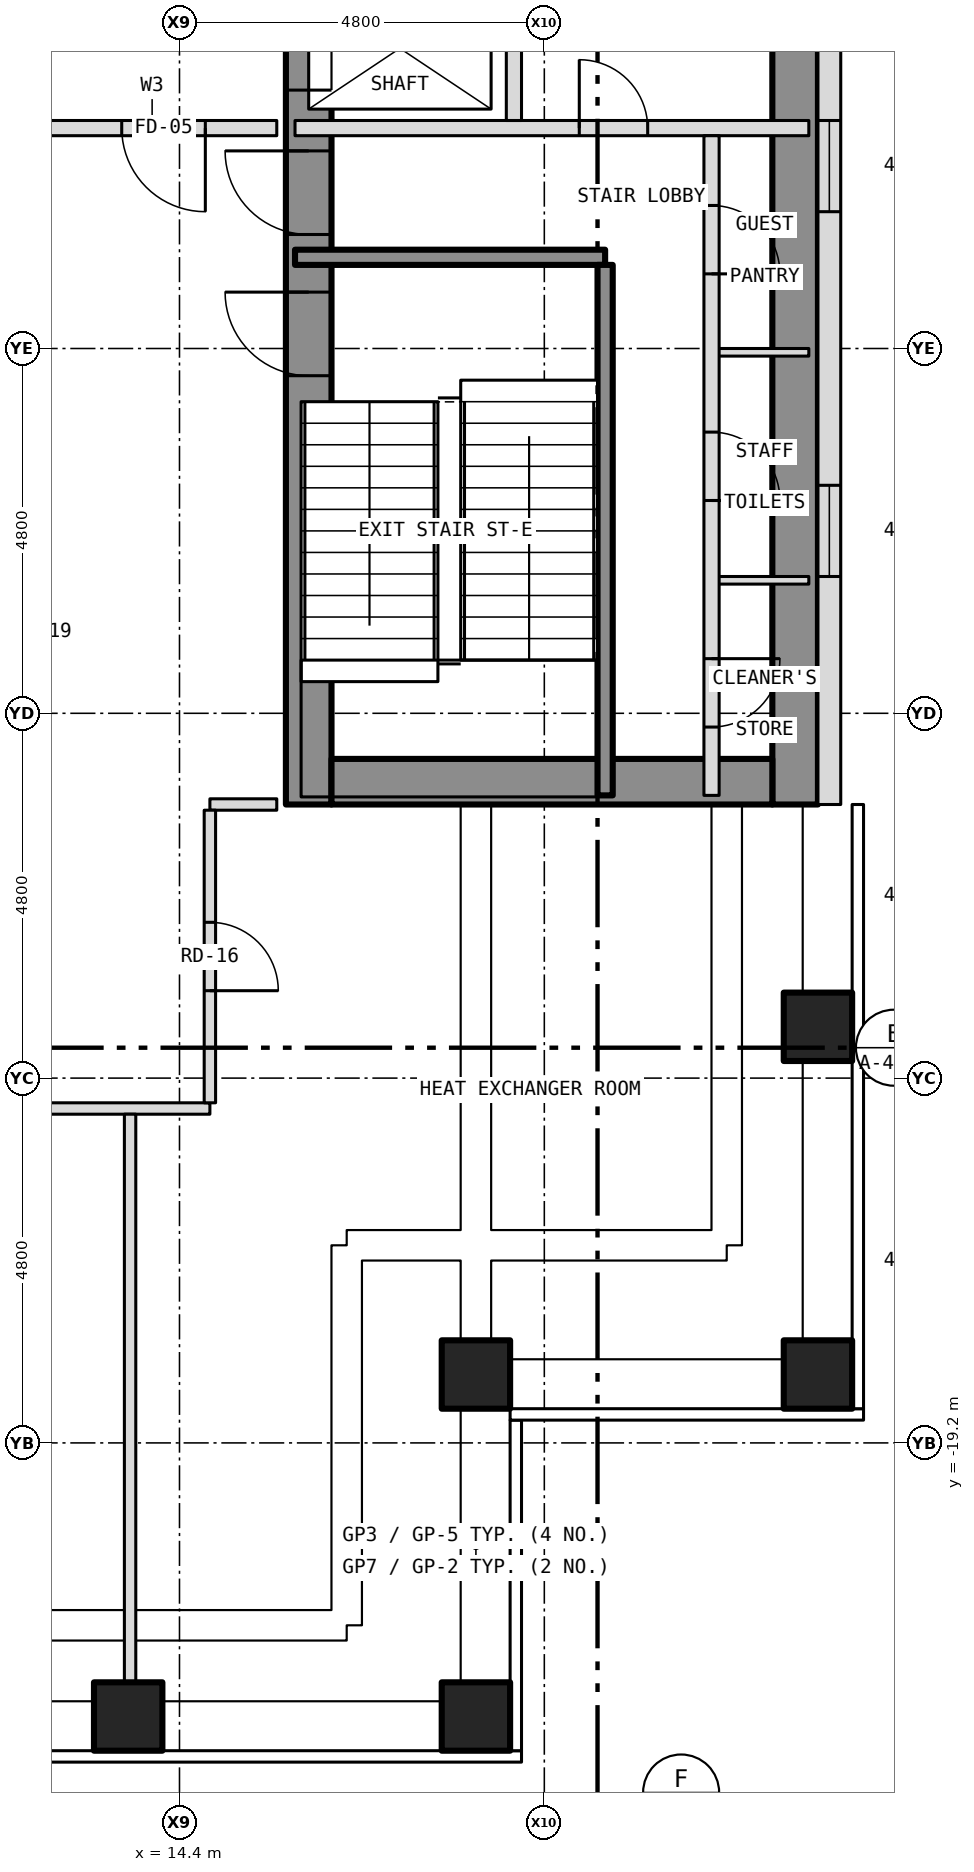
"""IFC4 building model, lengths in metres.
Left out: names, types, materials, properties, quantities, classifications, styles, units other than length and angle.
Written with IfcOpenShell. Run it as: python <this file> out.ifc"""

import sys

from ifc_helpers import new_model, si_unit, direction, frame, frame_2d, origin, origin_2d, place, context, subcontext, project, spatial, rectangle, hollow_rectangle, extrude, element, fill, save


model = new_model("IFC4")
c1 = context("Model", 3, precision=1e-05, world=origin(), true_north=direction((0.0, 1.0)))
c2 = subcontext(c1, "Body", "Model", "MODEL_VIEW")
j1 = project(units=[si_unit("LENGTHUNIT", "METRE"), si_unit("PLANEANGLEUNIT", "RADIAN")], contexts=[c1])
p1 = place(None, origin())
s1 = spatial("IfcSite", under=j1, at=p1, CompositionType="ELEMENT")
p2 = place(p1, origin())
s2 = spatial("IfcBuilding", under=s1, at=p2, CompositionType="ELEMENT")
p3 = place(p2, frame((0.0, 0.0, 138.0)))
s3 = spatial("IfcBuildingStorey", under=s2, at=p3, CompositionType="ELEMENT", Elevation=138.0)
for number, where, z_axis, x_axis in (
    (1, (13.725, -22.8, -0.3), (0.0, 0.0, 1.0), (1.0, 0.0, 0.0)),
    (2, (18.3, -22.8, -0.3), (0.0, 0.0, 1.0), (1.0, 0.0, 0.0)),
    (3, (22.8, -18.3, -0.3), (0.0, 0.0, 1.0), (1.0, 0.0, 0.0)),
    (4, (22.8, -13.725, -0.3), (0.0, 0.0, 1.0), (1.0, 0.0, 0.0)),
    (5, (18.3, -18.3, -0.3), (0.0, 0.0, 1.0), (1.0, 0.0, 0.0)),
):
    element("IfcColumn", number, at=place(p3, frame(where, z_axis=z_axis, x_axis=x_axis)), inside=s3, PredefinedType="COLUMN", context=c2, shape_type="SweptSolid", body=[
        extrude(hollow_rectangle(XDim=0.9, YDim=0.9, WallThickness=0.05, at=origin_2d()), origin(), (0.0, 0.0, 1.0), 4.6),
    ])
p4 = place(p3, frame((16.1, -10.8, 0.0), z_axis=(0.0, 0.0, 1.0), x_axis=(0.0, 1.0, 0.0)))
e6 = element("IfcWall", 6, at=p4, inside=s3, PredefinedType="SHEAR", context=c2, shape_type="SweptSolid", body=[
    extrude(rectangle(XDim=21.6, YDim=0.6, at=frame_2d((10.8, 0.0))), origin(), (0.0, 0.0, 1.0), 3.9),
])
p5 = place(p4, frame((9.4, 0.0, 0.0)))
e7 = element("IfcOpeningElement", 7, at=p5, cuts=e6, PredefinedType="OPENING", context=c2, shape_type="SweptSolid", body=[
    extrude(rectangle(XDim=1.1, YDim=2.1, at=frame_2d((0.55, 1.05))), frame((0.0, 0.312, 0.0), z_axis=(0.0, -1.0, 0.0), x_axis=(1.0, 0.0, 0.0)), (0.0, 0.0, 1.0), 0.624),
])
p6 = place(p4, frame((11.5, 0.0, 0.0)))
e8 = element("IfcOpeningElement", 8, at=p6, cuts=e6, PredefinedType="OPENING", context=c2, shape_type="SweptSolid", body=[
    extrude(rectangle(XDim=1.1, YDim=2.1, at=frame_2d((0.55, 1.05))), frame((0.0, 0.312, 0.0), z_axis=(0.0, -1.0, 0.0), x_axis=(1.0, 0.0, 0.0)), (0.0, 0.0, 1.0), 0.624),
])
p7 = place(p4, frame((5.642, 0.0, 0.0)))
e9 = element("IfcOpeningElement", 9, at=p7, cuts=e6, PredefinedType="OPENING", context=c2, shape_type="SweptSolid", body=[
    extrude(rectangle(XDim=1.1, YDim=2.1, at=frame_2d((0.55, 1.05))), frame((0.0, 0.312, 0.0), z_axis=(0.0, -1.0, 0.0), x_axis=(1.0, 0.0, 0.0)), (0.0, 0.0, 1.0), 0.624),
])
p8 = place(p4, frame((7.5, 0.0, 0.0)))
e10 = element("IfcOpeningElement", 10, at=p8, cuts=e6, PredefinedType="OPENING", context=c2, shape_type="SweptSolid", body=[
    extrude(rectangle(XDim=1.1, YDim=2.1, at=frame_2d((0.55, 1.05))), frame((0.0, 0.312, 0.0), z_axis=(0.0, -1.0, 0.0), x_axis=(1.0, 0.0, 0.0)), (0.0, 0.0, 1.0), 0.624),
])
p9 = place(p3, frame((22.5, -10.8, 0.0), z_axis=(0.0, 0.0, 1.0), x_axis=(0.0, 1.0, 0.0)))
e11 = element("IfcWall", 11, at=p9, inside=s3, PredefinedType="SHEAR", context=c2, shape_type="SweptSolid", body=[
    extrude(rectangle(XDim=21.6, YDim=0.6, at=frame_2d((10.8, 0.0))), origin(), (0.0, 0.0, 1.0), 3.9),
])
p10 = place(p3, frame((16.4, -10.5, 0.0), z_axis=(0.0, 0.0, 1.0), x_axis=(1.0, 0.0, 0.0)))
e12 = element("IfcWall", 12, at=p10, inside=s3, PredefinedType="SHEAR", context=c2, shape_type="SweptSolid", body=[
    extrude(rectangle(XDim=5.8, YDim=0.6, at=frame_2d((2.9, 0.0))), origin(), (0.0, 0.0, 1.0), 3.9),
])
p11 = place(p3, frame((22.95, -10.8, 0.0), z_axis=(0.0, 0.0, 1.0), x_axis=(0.0, 1.0, 0.0)))
e13 = element("IfcWall", 13, at=p11, inside=s3, PredefinedType="SOLIDWALL", context=c2, shape_type="SweptSolid", body=[
    extrude(rectangle(XDim=21.6, YDim=0.3, at=frame_2d((10.8, 0.0))), origin(), (0.0, 0.0, 1.0), 4.5),
])
p12 = place(p11, frame((3.0, 0.0, 2.2)))
e14 = element("IfcOpeningElement", 14, at=p12, cuts=e13, PredefinedType="OPENING", context=c2, shape_type="SweptSolid", body=[
    extrude(rectangle(XDim=1.2, YDim=0.6, at=frame_2d((0.6, 0.3))), frame((0.0, 0.162, 0.0), z_axis=(0.0, -1.0, 0.0), x_axis=(1.0, 0.0, 0.0)), (0.0, 0.0, 1.0), 0.324),
])
p13 = place(p11, frame((7.8, 0.0, 2.2)))
e15 = element("IfcOpeningElement", 15, at=p13, cuts=e13, PredefinedType="OPENING", context=c2, shape_type="SweptSolid", body=[
    extrude(rectangle(XDim=1.2, YDim=0.6, at=frame_2d((0.6, 0.3))), frame((0.0, 0.162, 0.0), z_axis=(0.0, -1.0, 0.0), x_axis=(1.0, 0.0, 0.0)), (0.0, 0.0, 1.0), 0.324),
])
p14 = place(p11, frame((12.6, 0.0, 2.2)))
e16 = element("IfcOpeningElement", 16, at=p14, cuts=e13, PredefinedType="OPENING", context=c2, shape_type="SweptSolid", body=[
    extrude(rectangle(XDim=1.2, YDim=0.6, at=frame_2d((0.6, 0.3))), frame((0.0, 0.162, 0.0), z_axis=(0.0, -1.0, 0.0), x_axis=(1.0, 0.0, 0.0)), (0.0, 0.0, 1.0), 0.324),
])
p15 = place(p11, frame((17.4, 0.0, 2.2)))
e17 = element("IfcOpeningElement", 17, at=p15, cuts=e13, PredefinedType="OPENING", context=c2, shape_type="SweptSolid", body=[
    extrude(rectangle(XDim=1.2, YDim=0.6, at=frame_2d((0.6, 0.3))), frame((0.0, 0.162, 0.0), z_axis=(0.0, -1.0, 0.0), x_axis=(1.0, 0.0, 0.0)), (0.0, 0.0, 1.0), 0.324),
])
p16 = place(p3, frame((-14.8, -14.8, 0.0), z_axis=(0.0, 0.0, 1.0), x_axis=(1.0, 0.0, 0.0)))
e18 = element("IfcWall", 18, at=p16, inside=s3, PredefinedType="PARTITIONING", context=c2, shape_type="SweptSolid", body=[
    extrude(rectangle(XDim=29.6, YDim=0.15, at=frame_2d((14.8, 0.0))), origin(), (0.0, 0.0, 1.0), 4.3),
])
p17 = place(p16, frame((7.488, 0.0, 0.0)))
e19 = element("IfcOpeningElement", 19, at=p17, cuts=e18, PredefinedType="OPENING", context=c2, shape_type="SweptSolid", body=[
    extrude(rectangle(XDim=0.9, YDim=2.1, at=frame_2d((0.45, 1.05))), frame((0.0, 0.087, 0.0), z_axis=(0.0, -1.0, 0.0), x_axis=(1.0, 0.0, 0.0)), (0.0, 0.0, 1.0), 0.174),
])
p18 = place(p16, frame((21.213, 0.0, 0.0)))
e20 = element("IfcOpeningElement", 20, at=p18, cuts=e18, PredefinedType="OPENING", context=c2, shape_type="SweptSolid", body=[
    extrude(rectangle(XDim=0.9, YDim=2.1, at=frame_2d((0.45, 1.05))), frame((0.0, 0.087, 0.0), z_axis=(0.0, -1.0, 0.0), x_axis=(1.0, 0.0, 0.0)), (0.0, 0.0, 1.0), 0.174),
])
p19 = place(p3, frame((14.8, -10.8, 0.0), z_axis=(0.0, 0.0, 1.0), x_axis=(1.0, 0.0, 0.0)))
e21 = element("IfcWall", 21, at=p19, inside=s3, PredefinedType="PARTITIONING", context=c2, shape_type="SweptSolid", body=[
    extrude(rectangle(XDim=0.88, YDim=0.15, at=frame_2d((0.44, 0.0))), origin(), (0.0, 0.0, 1.0), 4.3),
])
for number, where, z_axis, x_axis in (
    (22, (21.4, -7.85, 0.0), (0.0, 0.0, 1.0), (1.0, 0.0, 0.0)),
    (23, (21.4, -4.85, 0.0), (0.0, 0.0, 1.0), (1.0, 0.0, 0.0)),
):
    element("IfcWall", number, at=place(p3, frame(where, z_axis=z_axis, x_axis=x_axis)), inside=s3, PredefinedType="PARTITIONING", context=c2, shape_type="SweptSolid", body=[
        extrude(rectangle(XDim=1.28, YDim=0.1, at=frame_2d((0.64, 0.0))), origin(), (0.0, 0.0, 1.0), 3.9),
    ])
p20 = place(p3, frame((15.92, -3.6, 0.0), z_axis=(0.0, 0.0, 1.0), x_axis=(1.0, 0.0, 0.0)))
e24 = element("IfcWall", 24, at=p20, inside=s3, PredefinedType="SHEAR", context=c2, shape_type="SweptSolid", body=[
    extrude(rectangle(XDim=4.08, YDim=0.2, at=frame_2d((2.04, 0.0))), origin(), (0.0, 0.0, 1.0), 3.9),
])
p21 = place(p3, frame((12.4, -1.9, 0.0), z_axis=(0.0, 0.0, 1.0), x_axis=(1.0, 0.0, 0.0)))
e25 = element("IfcWall", 25, at=p21, inside=s3, PredefinedType="PARTITIONING", context=c2, shape_type="SweptSolid", body=[
    extrude(rectangle(XDim=3.28, YDim=0.2, at=frame_2d((1.64, 0.0))), origin(), (0.0, 0.0, 1.0), 4.3),
])
p22 = place(p21, frame((1.24, 0.0, 0.0)))
e26 = element("IfcOpeningElement", 26, at=p22, cuts=e25, PredefinedType="OPENING", context=c2, shape_type="SweptSolid", body=[
    extrude(rectangle(XDim=1.1, YDim=2.1, at=frame_2d((0.55, 1.05))), frame((0.0, 0.112, 0.0), z_axis=(0.0, -1.0, 0.0), x_axis=(1.0, 0.0, 0.0)), (0.0, 0.0, 1.0), 0.224),
])
p23 = place(p3, frame((15.92, -1.9, 0.0), z_axis=(0.0, 0.0, 1.0), x_axis=(1.0, 0.0, 0.0)))
e27 = element("IfcWall", 27, at=p23, inside=s3, PredefinedType="PARTITIONING", context=c2, shape_type="SweptSolid", body=[
    extrude(rectangle(XDim=6.76, YDim=0.2, at=frame_2d((3.38, 0.0))), origin(), (0.0, 0.0, 1.0), 3.9),
])
p24 = place(p23, frame((3.74, 0.0, 0.0)))
e28 = element("IfcOpeningElement", 28, at=p24, cuts=e27, PredefinedType="OPENING", context=c2, shape_type="SweptSolid", body=[
    extrude(rectangle(XDim=0.9, YDim=2.1, at=frame_2d((0.45, 1.05))), frame((0.0, 0.112, 0.0), z_axis=(0.0, -1.0, 0.0), x_axis=(1.0, 0.0, 0.0)), (0.0, 0.0, 1.0), 0.224),
])
p25 = place(p3, frame((13.75, -22.68, 0.0), z_axis=(0.0, 0.0, 1.0), x_axis=(0.0, 1.0, 0.0)))
e29 = element("IfcWall", 29, at=p25, inside=s3, PredefinedType="PARTITIONING", context=c2, shape_type="SweptSolid", body=[
    extrude(rectangle(XDim=7.805, YDim=0.15, at=frame_2d((3.902, 0.0))), origin(), (0.0, 0.0, 1.0), 4.3),
])
p26 = place(p3, frame((14.8, -14.725, 0.0), z_axis=(0.0, 0.0, 1.0), x_axis=(0.0, 1.0, 0.0)))
e30 = element("IfcWall", 30, at=p26, inside=s3, PredefinedType="PARTITIONING", context=c2, shape_type="SweptSolid", body=[
    extrude(rectangle(XDim=3.85, YDim=0.15, at=frame_2d((1.925, 0.0))), origin(), (0.0, 0.0, 1.0), 4.3),
])
p27 = place(p26, frame((1.475, 0.0, 0.0)))
e31 = element("IfcOpeningElement", 31, at=p27, cuts=e30, PredefinedType="OPENING", context=c2, shape_type="SweptSolid", body=[
    extrude(rectangle(XDim=0.9, YDim=2.1, at=frame_2d((0.45, 1.05))), frame((0.0, 0.087, 0.0), z_axis=(0.0, -1.0, 0.0), x_axis=(1.0, 0.0, 0.0)), (0.0, 0.0, 1.0), 0.174),
])
p28 = place(p3, frame((18.8, -1.8, 0.0), z_axis=(0.0, 0.0, 1.0), x_axis=(0.0, 1.0, 0.0)))
e32 = element("IfcWall", 32, at=p28, inside=s3, PredefinedType="PARTITIONING", context=c2, shape_type="SweptSolid", body=[
    extrude(rectangle(XDim=12.48, YDim=0.2, at=frame_2d((6.24, 0.0))), origin(), (0.0, 0.0, 1.0), 3.9),
])
p29 = place(p3, frame((20.0, -10.68, 0.0), z_axis=(0.0, 0.0, 1.0), x_axis=(0.0, 1.0, 0.0)))
e33 = element("IfcWall", 33, at=p29, inside=s3, PredefinedType="SHEAR", context=c2, shape_type="SweptSolid", body=[
    extrude(rectangle(XDim=6.98, YDim=0.2, at=frame_2d((3.49, 0.0))), origin(), (0.0, 0.0, 1.0), 3.9),
])
p30 = place(p3, frame((21.4, -10.68, 0.0), z_axis=(0.0, 0.0, 1.0), x_axis=(0.0, 1.0, 0.0)))
e34 = element("IfcWall", 34, at=p30, inside=s3, PredefinedType="PARTITIONING", context=c2, shape_type="SweptSolid", body=[
    extrude(rectangle(XDim=8.68, YDim=0.2, at=frame_2d((4.34, 0.0))), origin(), (0.0, 0.0, 1.0), 3.9),
])
p31 = place(p30, frame((0.899, 0.0, 0.0)))
e35 = element("IfcOpeningElement", 35, at=p31, cuts=e34, PredefinedType="OPENING", context=c2, shape_type="SweptSolid", body=[
    extrude(rectangle(XDim=0.9, YDim=2.1, at=frame_2d((0.45, 1.05))), frame((0.0, 0.112, 0.0), z_axis=(0.0, -1.0, 0.0), x_axis=(1.0, 0.0, 0.0)), (0.0, 0.0, 1.0), 0.224),
])
p32 = place(p30, frame((3.88, 0.0, 0.0)))
e36 = element("IfcOpeningElement", 36, at=p32, cuts=e34, PredefinedType="OPENING", context=c2, shape_type="SweptSolid", body=[
    extrude(rectangle(XDim=0.9, YDim=2.1, at=frame_2d((0.45, 1.05))), frame((0.0, 0.112, 0.0), z_axis=(0.0, -1.0, 0.0), x_axis=(1.0, 0.0, 0.0)), (0.0, 0.0, 1.0), 0.224),
])
p33 = place(p30, frame((6.862, 0.0, 0.0)))
e37 = element("IfcOpeningElement", 37, at=p33, cuts=e34, PredefinedType="OPENING", context=c2, shape_type="SweptSolid", body=[
    extrude(rectangle(XDim=0.9, YDim=2.1, at=frame_2d((0.45, 1.05))), frame((0.0, 0.112, 0.0), z_axis=(0.0, -1.0, 0.0), x_axis=(1.0, 0.0, 0.0)), (0.0, 0.0, 1.0), 0.224),
])
p34 = place(p12, origin())
e38 = element("IfcWindow", 38, at=p34, inside=s3, PartitioningType="SINGLE_PANEL", PredefinedType="WINDOW", context=c2, shape_type="SweptSolid", body=[
    extrude(rectangle(XDim=1.2, YDim=0.6, at=frame_2d((0.6, 0.3))), frame((0.0, -0.06, 0.0), z_axis=(0.0, -1.0, 0.0), x_axis=(1.0, 0.0, 0.0)), (0.0, 0.0, 1.0), 0.06),
])
fill(e14, e38)
p35 = place(p13, origin())
e39 = element("IfcWindow", 39, at=p35, inside=s3, PartitioningType="SINGLE_PANEL", PredefinedType="WINDOW", context=c2, shape_type="SweptSolid", body=[
    extrude(rectangle(XDim=1.2, YDim=0.6, at=frame_2d((0.6, 0.3))), frame((0.0, -0.06, 0.0), z_axis=(0.0, -1.0, 0.0), x_axis=(1.0, 0.0, 0.0)), (0.0, 0.0, 1.0), 0.06),
])
fill(e15, e39)
p36 = place(p5, origin())
e40 = element("IfcDoor", 40, at=p36, inside=s3, OperationType="SLIDING_TO_LEFT", PredefinedType="DOOR", context=c2, shape_type="SweptSolid", body=[
    extrude(rectangle(XDim=1.1, YDim=2.1, at=frame_2d((0.55, 1.05))), frame((0.0, 0.025, 0.0), z_axis=(0.0, -1.0, 0.0), x_axis=(1.0, 0.0, 0.0)), (0.0, 0.0, 1.0), 0.05),
])
fill(e7, e40)
p37 = place(p7, origin())
e41 = element("IfcDoor", 41, at=p37, inside=s3, OperationType="SINGLE_SWING_RIGHT", PredefinedType="DOOR", context=c2, shape_type="SweptSolid", body=[
    extrude(rectangle(XDim=1.1, YDim=2.1, at=frame_2d((0.55, 1.05))), frame((0.0, 0.025, 0.0), z_axis=(0.0, -1.0, 0.0), x_axis=(1.0, 0.0, 0.0)), (0.0, 0.0, 1.0), 0.05),
])
fill(e9, e41)
p38 = place(p8, origin())
e42 = element("IfcDoor", 42, at=p38, inside=s3, OperationType="SINGLE_SWING_RIGHT", PredefinedType="DOOR", context=c2, shape_type="SweptSolid", body=[
    extrude(rectangle(XDim=1.1, YDim=2.1, at=frame_2d((0.55, 1.05))), frame((0.0, 0.025, 0.0), z_axis=(0.0, -1.0, 0.0), x_axis=(1.0, 0.0, 0.0)), (0.0, 0.0, 1.0), 0.05),
])
fill(e10, e42)
p39 = place(p31, origin())
e43 = element("IfcDoor", 43, at=p39, inside=s3, OperationType="SINGLE_SWING_RIGHT", PredefinedType="DOOR", context=c2, shape_type="SweptSolid", body=[
    extrude(rectangle(XDim=0.9, YDim=2.1, at=frame_2d((0.45, 1.05))), frame((0.0, 0.025, 0.0), z_axis=(0.0, -1.0, 0.0), x_axis=(1.0, 0.0, 0.0)), (0.0, 0.0, 1.0), 0.05),
])
fill(e35, e43)
p40 = place(p32, origin())
e44 = element("IfcDoor", 44, at=p40, inside=s3, OperationType="SINGLE_SWING_LEFT", PredefinedType="DOOR", context=c2, shape_type="SweptSolid", body=[
    extrude(rectangle(XDim=0.9, YDim=2.1, at=frame_2d((0.45, 1.05))), frame((0.0, 0.025, 0.0), z_axis=(0.0, -1.0, 0.0), x_axis=(1.0, 0.0, 0.0)), (0.0, 0.0, 1.0), 0.05),
])
fill(e36, e44)
p41 = place(p33, origin())
e45 = element("IfcDoor", 45, at=p41, inside=s3, OperationType="SINGLE_SWING_LEFT", PredefinedType="DOOR", context=c2, shape_type="SweptSolid", body=[
    extrude(rectangle(XDim=0.9, YDim=2.1, at=frame_2d((0.45, 1.05))), frame((0.0, 0.025, 0.0), z_axis=(0.0, -1.0, 0.0), x_axis=(1.0, 0.0, 0.0)), (0.0, 0.0, 1.0), 0.05),
])
fill(e37, e45)
p42 = place(p24, origin())
e46 = element("IfcDoor", 46, at=p42, inside=s3, OperationType="SINGLE_SWING_LEFT", PredefinedType="DOOR", context=c2, shape_type="SweptSolid", body=[
    extrude(rectangle(XDim=0.9, YDim=2.1, at=frame_2d((0.45, 1.05))), frame((0.0, 0.025, 0.0), z_axis=(0.0, -1.0, 0.0), x_axis=(1.0, 0.0, 0.0)), (0.0, 0.0, 1.0), 0.05),
])
fill(e28, e46)
p43 = place(p22, origin())
e47 = element("IfcDoor", 47, at=p43, inside=s3, OperationType="SINGLE_SWING_RIGHT", PredefinedType="DOOR", context=c2, shape_type="SweptSolid", body=[
    extrude(rectangle(XDim=1.1, YDim=2.1, at=frame_2d((0.55, 1.05))), frame((0.0, 0.025, 0.0), z_axis=(0.0, -1.0, 0.0), x_axis=(1.0, 0.0, 0.0)), (0.0, 0.0, 1.0), 0.05),
])
fill(e26, e47)
p44 = place(p27, origin())
e48 = element("IfcDoor", 48, at=p44, inside=s3, OperationType="SINGLE_SWING_LEFT", PredefinedType="DOOR", context=c2, shape_type="SweptSolid", body=[
    extrude(rectangle(XDim=0.9, YDim=2.1, at=frame_2d((0.45, 1.05))), frame((0.0, 0.025, 0.0), z_axis=(0.0, -1.0, 0.0), x_axis=(1.0, 0.0, 0.0)), (0.0, 0.0, 1.0), 0.05),
])
fill(e31, e48)
save(model, sys.argv[1])
